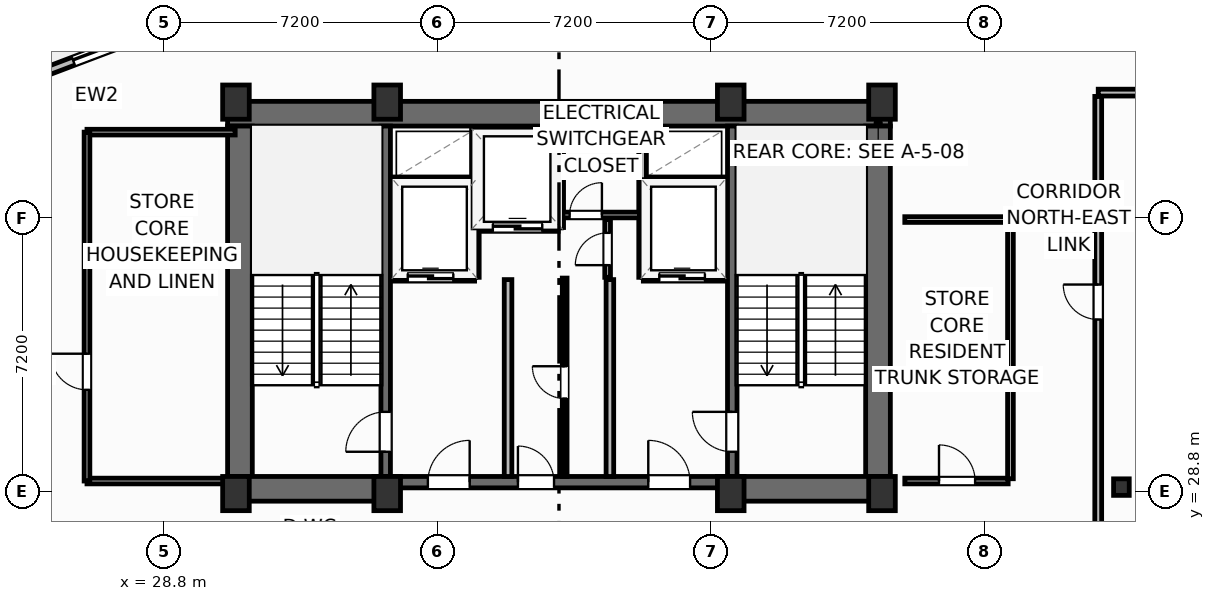
"""IFC4 building model, lengths in metres.
Left out: names, types, materials, properties, quantities, classifications, styles, units other than length and angle.
Written with IfcOpenShell. Run it as: python <this file> out.ifc"""

import sys

from ifc_helpers import new_model, si_unit, direction, frame, frame_2d, origin, origin_2d, place, context, subcontext, project, spatial, rectangle, i_section, extrude, element, fill, save


model = new_model("IFC4")
c1 = context("Model", 3, precision=1e-05, world=origin(), true_north=direction((0.0, 1.0)))
c2 = subcontext(c1, "Body", "Model", "MODEL_VIEW")
j1 = project(units=[si_unit("LENGTHUNIT", "METRE"), si_unit("PLANEANGLEUNIT", "RADIAN")], contexts=[c1])
p1 = place(None, origin())
s1 = spatial("IfcSite", under=j1, at=p1, CompositionType="ELEMENT")
p2 = place(p1, origin())
s2 = spatial("IfcBuilding", under=s1, at=p2, CompositionType="ELEMENT")
p3 = place(p2, frame((0.0, 0.0, 231.2)))
s3 = spatial("IfcBuildingStorey", under=s2, at=p3, CompositionType="ELEMENT", Elevation=231.2)
for number, where, z_axis, x_axis in (
    (1, (30.7, 28.75, 0.0), (0.0, 0.0, 1.0), (1.0, 0.0, 0.0)),
    (2, (34.68, 28.75, 0.0), (0.0, 0.0, 1.0), (1.0, 0.0, 0.0)),
    (3, (43.72, 28.75, 0.0), (0.0, 0.0, 1.0), (1.0, 0.0, 0.0)),
    (4, (47.7, 28.75, 0.0), (0.0, 0.0, 1.0), (1.0, 0.0, 0.0)),
    (5, (30.7, 39.05, 0.0), (0.0, 0.0, 1.0), (1.0, 0.0, 0.0)),
    (6, (34.68, 39.05, 0.0), (0.0, 0.0, 1.0), (1.0, 0.0, 0.0)),
    (7, (43.72, 39.05, 0.0), (0.0, 0.0, 1.0), (1.0, 0.0, 0.0)),
    (8, (47.7, 39.05, 0.0), (0.0, 0.0, 1.0), (1.0, 0.0, 0.0)),
):
    element("IfcColumn", number, at=place(p3, frame(where, z_axis=z_axis, x_axis=x_axis)), inside=s3, PredefinedType="COLUMN", context=c2, shape_type="SweptSolid", body=[
        extrude(rectangle(XDim=0.7, YDim=0.9, at=origin_2d()), origin(), (0.0, 0.0, 1.0), 3.7),
    ])
p4 = place(p3, frame((54.0, 28.92, 0.0), z_axis=(0.0, 0.0, 1.0), x_axis=(1.0, 0.0, 0.0)))
e9 = element("IfcColumn", 9, at=p4, inside=s3, PredefinedType="COLUMN", context=c2, shape_type="SweptSolid", body=[
    extrude(i_section(OverallWidth=0.412, OverallDepth=0.435, WebThickness=0.036, FlangeThickness=0.057, FilletRadius=0.025, at=origin_2d()), origin(), (0.0, 0.0, 1.0), 3.7),
])
p5 = place(p3, frame((30.48, 38.745, 0.0), z_axis=(0.0, 0.0, 1.0), x_axis=(1.0, 0.0, 0.0)))
e10 = element("IfcWall", 10, at=p5, inside=s3, PredefinedType="SHEAR", context=c2, shape_type="SweptSolid", body=[
    extrude(rectangle(XDim=17.44, YDim=0.65, at=frame_2d((8.72, 0.0))), origin(), (0.0, 0.0, 1.0), 3.45),
])
for number, where, z_axis, x_axis in (
    (11, (30.805, 29.2, 0.0), (0.0, 0.0, 1.0), (0.0, 1.0, 0.0)),
    (12, (47.595, 29.2, 0.0), (0.0, 0.0, 1.0), (0.0, 1.0, 0.0)),
):
    element("IfcWall", number, at=place(p3, frame(where, z_axis=z_axis, x_axis=x_axis)), inside=s3, PredefinedType="SHEAR", context=c2, shape_type="SweptSolid", body=[
        extrude(rectangle(XDim=9.22, YDim=0.65, at=frame_2d((4.61, 0.0))), origin(), (0.0, 0.0, 1.0), 3.45),
    ])
p6 = place(p3, frame((30.48, 28.875, 0.0), z_axis=(0.0, 0.0, 1.0), x_axis=(1.0, 0.0, 0.0)))
e13 = element("IfcWall", 13, at=p6, inside=s3, PredefinedType="SHEAR", context=c2, shape_type="SweptSolid", body=[
    extrude(rectangle(XDim=4.32, YDim=0.65, at=frame_2d((2.16, 0.0))), origin(), (0.0, 0.0, 1.0), 3.45),
])
p7 = place(p3, frame((43.6, 28.875, 0.0), z_axis=(0.0, 0.0, 1.0), x_axis=(1.0, 0.0, 0.0)))
e14 = element("IfcWall", 14, at=p7, inside=s3, PredefinedType="SHEAR", context=c2, shape_type="SweptSolid", body=[
    extrude(rectangle(XDim=4.32, YDim=0.65, at=frame_2d((2.16, 0.0))), origin(), (0.0, 0.0, 1.0), 3.45),
])
p8 = place(p3, frame((34.8, 29.05, 0.0), z_axis=(0.0, 0.0, 1.0), x_axis=(1.0, 0.0, 0.0)))
e15 = element("IfcWall", 15, at=p8, inside=s3, PredefinedType="SHEAR", context=c2, shape_type="SweptSolid", body=[
    extrude(rectangle(XDim=8.8, YDim=0.3, at=frame_2d((4.4, 0.0))), origin(), (0.0, 0.0, 1.0), 3.45),
])
p9 = place(p8, frame((0.95, 0.0, 0.0)))
e16 = element("IfcOpeningElement", 16, at=p9, cuts=e15, PredefinedType="OPENING", context=c2, shape_type="SweptSolid", body=[
    extrude(rectangle(XDim=1.1, YDim=2.15, at=frame_2d((0.55, 1.075))), frame((0.0, 0.16, 0.0), z_axis=(0.0, -1.0, 0.0), x_axis=(1.0, 0.0, 0.0)), (0.0, 0.0, 1.0), 0.32),
])
p10 = place(p8, frame((6.75, 0.0, 0.0)))
e17 = element("IfcOpeningElement", 17, at=p10, cuts=e15, PredefinedType="OPENING", context=c2, shape_type="SweptSolid", body=[
    extrude(rectangle(XDim=1.1, YDim=2.15, at=frame_2d((0.55, 1.075))), frame((0.0, 0.16, 0.0), z_axis=(0.0, -1.0, 0.0), x_axis=(1.0, 0.0, 0.0)), (0.0, 0.0, 1.0), 0.32),
])
p11 = place(p8, frame((3.32, 0.0, 0.0)))
e18 = element("IfcOpeningElement", 18, at=p11, cuts=e15, PredefinedType="OPENING", context=c2, shape_type="SweptSolid", body=[
    extrude(rectangle(XDim=0.95, YDim=2.15, at=frame_2d((0.475, 1.075))), frame((0.0, 0.16, 0.0), z_axis=(0.0, -1.0, 0.0), x_axis=(1.0, 0.0, 0.0)), (0.0, 0.0, 1.0), 0.32),
])
p12 = place(p3, frame((34.64, 29.2, 0.0), z_axis=(0.0, 0.0, 1.0), x_axis=(0.0, 1.0, 0.0)))
e19 = element("IfcWall", 19, at=p12, inside=s3, PredefinedType="SHEAR", context=c2, shape_type="SweptSolid", body=[
    extrude(rectangle(XDim=9.22, YDim=0.25, at=frame_2d((4.61, 0.0))), origin(), (0.0, 0.0, 1.0), 3.45),
])
p13 = place(p12, frame((0.65, 0.0, 0.0)))
e20 = element("IfcOpeningElement", 20, at=p13, cuts=e19, PredefinedType="OPENING", context=c2, shape_type="SweptSolid", body=[
    extrude(rectangle(XDim=1.05, YDim=2.15, at=frame_2d((0.525, 1.075))), frame((0.0, 0.135, 0.0), z_axis=(0.0, -1.0, 0.0), x_axis=(1.0, 0.0, 0.0)), (0.0, 0.0, 1.0), 0.27),
])
p14 = place(p3, frame((43.76, 29.2, 0.0), z_axis=(0.0, 0.0, 1.0), x_axis=(0.0, 1.0, 0.0)))
e21 = element("IfcWall", 21, at=p14, inside=s3, PredefinedType="SHEAR", context=c2, shape_type="SweptSolid", body=[
    extrude(rectangle(XDim=9.22, YDim=0.25, at=frame_2d((4.61, 0.0))), origin(), (0.0, 0.0, 1.0), 3.45),
])
p15 = place(p14, frame((0.65, 0.0, 0.0)))
e22 = element("IfcOpeningElement", 22, at=p15, cuts=e21, PredefinedType="OPENING", context=c2, shape_type="SweptSolid", body=[
    extrude(rectangle(XDim=1.05, YDim=2.15, at=frame_2d((0.525, 1.075))), frame((0.0, 0.135, 0.0), z_axis=(0.0, -1.0, 0.0), x_axis=(1.0, 0.0, 0.0)), (0.0, 0.0, 1.0), 0.27),
])
p16 = place(p3, frame((23.149, 38.887, 0.0), z_axis=(0.0, 0.0, 1.0), x_axis=(0.9352192676, 0.354069091436, 0.0)))
e23 = element("IfcWall", 23, at=p16, inside=s3, PredefinedType="SOLIDWALL", context=c2, shape_type="SweptSolid", body=[
    extrude(rectangle(XDim=6.0, YDim=0.22, at=frame_2d((3.0, 0.0))), origin(), (0.0, 0.0, 1.0), 2.73),
])
p17 = place(p16, frame((3.5, 0.0, 0.0)))
e24 = element("IfcOpeningElement", 24, at=p17, cuts=e23, PredefinedType="OPENING", context=c2, shape_type="SweptSolid", body=[
    extrude(rectangle(XDim=2.1, YDim=2.3, at=frame_2d((1.05, 1.15))), frame((0.0, 0.12, 0.0), z_axis=(0.0, -1.0, 0.0), x_axis=(1.0, 0.0, 0.0)), (0.0, 0.0, 1.0), 0.24),
])
p18 = place(p16, frame((0.55, 0.0, 0.75)))
e25 = element("IfcOpeningElement", 25, at=p18, cuts=e23, PredefinedType="OPENING", context=c2, shape_type="SweptSolid", body=[
    extrude(rectangle(XDim=1.85, YDim=1.75, at=frame_2d((0.925, 0.875))), frame((0.0, 0.12, 0.0), z_axis=(0.0, -1.0, 0.0), x_axis=(1.0, 0.0, 0.0)), (0.0, 0.0, 1.0), 0.24),
])
p19 = place(p3, frame((53.39, 27.53, 0.0), z_axis=(0.0, 0.0, 1.0), x_axis=(0.0, 1.0, 0.0)))
e26 = element("IfcWall", 26, at=p19, inside=s3, PredefinedType="PARTITIONING", context=c2, shape_type="SweptSolid", body=[
    extrude(rectangle(XDim=11.67, YDim=0.18, at=frame_2d((5.835, 0.0))), origin(), (0.0, 0.0, 1.0), 3.45),
])
p20 = place(p19, frame((5.8, 0.0, 0.0)))
e27 = element("IfcOpeningElement", 27, at=p20, cuts=e26, PredefinedType="OPENING", context=c2, shape_type="SweptSolid", body=[
    extrude(rectangle(XDim=0.92, YDim=2.05, at=frame_2d((0.46, 1.025))), frame((0.0, 0.1, 0.0), z_axis=(0.0, -1.0, 0.0), x_axis=(1.0, 0.0, 0.0)), (0.0, 0.0, 1.0), 0.2),
])
p21 = place(p3, frame((53.39, 39.3, 0.0), z_axis=(0.0, 0.0, 1.0), x_axis=(1.0, 0.0, 0.0)))
e28 = element("IfcWall", 28, at=p21, inside=s3, PredefinedType="PARTITIONING", context=c2, shape_type="SweptSolid", body=[
    extrude(rectangle(XDim=15.713, YDim=0.18, at=frame_2d((7.856, 0.0))), origin(), (0.0, 0.0, 1.0), 3.45),
])
for number, where, z_axis, x_axis in (
    (29, (37.86, 29.2, 0.0), (0.0, 0.0, 1.0), (0.0, 1.0, 0.0)),
    (30, (40.54, 29.2, 0.0), (0.0, 0.0, 1.0), (0.0, 1.0, 0.0)),
):
    element("IfcWall", number, at=place(p3, frame(where, z_axis=z_axis, x_axis=x_axis)), inside=s3, PredefinedType="PARTITIONING", context=c2, shape_type="SweptSolid", body=[
        extrude(rectangle(XDim=5.18, YDim=0.2, at=frame_2d((2.59, 0.0))), origin(), (0.0, 0.0, 1.0), 3.45),
    ])
p22 = place(p3, frame((34.8, 34.44, 0.0), z_axis=(0.0, 0.0, 1.0), x_axis=(1.0, 0.0, 0.0)))
e31 = element("IfcWall", 31, at=p22, inside=s3, PredefinedType="PARTITIONING", context=c2, shape_type="SweptSolid", body=[
    extrude(rectangle(XDim=2.18, YDim=0.2, at=frame_2d((1.09, 0.0))), origin(), (0.0, 0.0, 1.0), 3.45),
])
p23 = place(p22, frame((0.42, 0.0, 0.0)))
e32 = element("IfcOpeningElement", 32, at=p23, cuts=e31, PredefinedType="OPENING", context=c2, shape_type="SweptSolid", body=[
    extrude(rectangle(XDim=1.2, YDim=2.2, at=frame_2d((0.6, 1.1))), frame((0.0, 0.11, 0.0), z_axis=(0.0, -1.0, 0.0), x_axis=(1.0, 0.0, 0.0)), (0.0, 0.0, 1.0), 0.22),
])
p24 = place(p3, frame((34.8, 36.98, 0.0), z_axis=(0.0, 0.0, 1.0), x_axis=(1.0, 0.0, 0.0)))
e33 = element("IfcWall", 33, at=p24, inside=s3, PredefinedType="PARTITIONING", context=c2, shape_type="SweptSolid", body=[
    extrude(rectangle(XDim=2.18, YDim=0.2, at=frame_2d((1.09, 0.0))), origin(), (0.0, 0.0, 1.0), 3.45),
])
p25 = place(p3, frame((37.0, 34.44, 0.0), z_axis=(0.0, 0.0, 1.0), x_axis=(0.0, 1.0, 0.0)))
e34 = element("IfcWall", 34, at=p25, inside=s3, PredefinedType="PARTITIONING", context=c2, shape_type="SweptSolid", body=[
    extrude(rectangle(XDim=3.9, YDim=0.2, at=frame_2d((1.95, 0.0))), origin(), (0.0, 0.0, 1.0), 3.45),
])
p26 = place(p3, frame((41.42, 34.44, 0.0), z_axis=(0.0, 0.0, 1.0), x_axis=(1.0, 0.0, 0.0)))
e35 = element("IfcWall", 35, at=p26, inside=s3, PredefinedType="PARTITIONING", context=c2, shape_type="SweptSolid", body=[
    extrude(rectangle(XDim=2.18, YDim=0.2, at=frame_2d((1.09, 0.0))), origin(), (0.0, 0.0, 1.0), 3.45),
])
p27 = place(p26, frame((0.42, 0.0, 0.0)))
e36 = element("IfcOpeningElement", 36, at=p27, cuts=e35, PredefinedType="OPENING", context=c2, shape_type="SweptSolid", body=[
    extrude(rectangle(XDim=1.2, YDim=2.2, at=frame_2d((0.6, 1.1))), frame((0.0, 0.11, 0.0), z_axis=(0.0, -1.0, 0.0), x_axis=(1.0, 0.0, 0.0)), (0.0, 0.0, 1.0), 0.22),
])
p28 = place(p3, frame((41.42, 36.98, 0.0), z_axis=(0.0, 0.0, 1.0), x_axis=(1.0, 0.0, 0.0)))
e37 = element("IfcWall", 37, at=p28, inside=s3, PredefinedType="PARTITIONING", context=c2, shape_type="SweptSolid", body=[
    extrude(rectangle(XDim=2.18, YDim=0.2, at=frame_2d((1.09, 0.0))), origin(), (0.0, 0.0, 1.0), 3.45),
])
p29 = place(p3, frame((41.4, 34.44, 0.0), z_axis=(0.0, 0.0, 1.0), x_axis=(0.0, 1.0, 0.0)))
e38 = element("IfcWall", 38, at=p29, inside=s3, PredefinedType="PARTITIONING", context=c2, shape_type="SweptSolid", body=[
    extrude(rectangle(XDim=3.9, YDim=0.2, at=frame_2d((1.95, 0.0))), origin(), (0.0, 0.0, 1.0), 3.45),
])
p30 = place(p3, frame((37.06, 35.75, 0.0), z_axis=(0.0, 0.0, 1.0), x_axis=(1.0, 0.0, 0.0)))
e39 = element("IfcWall", 39, at=p30, inside=s3, PredefinedType="PARTITIONING", context=c2, shape_type="SweptSolid", body=[
    extrude(rectangle(XDim=2.12, YDim=0.2, at=frame_2d((1.06, 0.0))), origin(), (0.0, 0.0, 1.0), 3.45),
])
p31 = place(p30, frame((0.4, 0.0, 0.0)))
e40 = element("IfcOpeningElement", 40, at=p31, cuts=e39, PredefinedType="OPENING", context=c2, shape_type="SweptSolid", body=[
    extrude(rectangle(XDim=1.3, YDim=2.2, at=frame_2d((0.65, 1.1))), frame((0.0, 0.11, 0.0), z_axis=(0.0, -1.0, 0.0), x_axis=(1.0, 0.0, 0.0)), (0.0, 0.0, 1.0), 0.22),
])
p32 = place(p3, frame((39.22, 35.75, 0.0), z_axis=(0.0, 0.0, 1.0), x_axis=(0.0, 1.0, 0.0)))
e41 = element("IfcWall", 41, at=p32, inside=s3, PredefinedType="PARTITIONING", context=c2, shape_type="SweptSolid", body=[
    extrude(rectangle(XDim=2.59, YDim=0.2, at=frame_2d((1.295, 0.0))), origin(), (0.0, 0.0, 1.0), 3.45),
])
p33 = place(p3, frame((39.3, 36.08, 0.0), z_axis=(0.0, 0.0, 1.0), x_axis=(1.0, 0.0, 0.0)))
e42 = element("IfcWall", 42, at=p33, inside=s3, PredefinedType="PARTITIONING", context=c2, shape_type="SweptSolid", body=[
    extrude(rectangle(XDim=2.02, YDim=0.15, at=frame_2d((1.01, 0.0))), origin(), (0.0, 0.0, 1.0), 3.45),
])
p34 = place(p33, frame((0.18, 0.0, 0.0)))
e43 = element("IfcOpeningElement", 43, at=p34, cuts=e42, PredefinedType="OPENING", context=c2, shape_type="SweptSolid", body=[
    extrude(rectangle(XDim=0.85, YDim=2.05, at=frame_2d((0.425, 1.025))), frame((0.0, 0.085, 0.0), z_axis=(0.0, -1.0, 0.0), x_axis=(1.0, 0.0, 0.0)), (0.0, 0.0, 1.0), 0.17),
])
p35 = place(p3, frame((40.48, 34.44, 0.0), z_axis=(0.0, 0.0, 1.0), x_axis=(0.0, 1.0, 0.0)))
e44 = element("IfcWall", 44, at=p35, inside=s3, PredefinedType="PARTITIONING", context=c2, shape_type="SweptSolid", body=[
    extrude(rectangle(XDim=1.52, YDim=0.15, at=frame_2d((0.76, 0.0))), origin(), (0.0, 0.0, 1.0), 3.45),
])
p36 = place(p35, frame((0.32, 0.0, 0.0)))
e45 = element("IfcOpeningElement", 45, at=p36, cuts=e44, PredefinedType="OPENING", context=c2, shape_type="SweptSolid", body=[
    extrude(rectangle(XDim=0.85, YDim=2.05, at=frame_2d((0.425, 1.025))), frame((0.0, 0.085, 0.0), z_axis=(0.0, -1.0, 0.0), x_axis=(1.0, 0.0, 0.0)), (0.0, 0.0, 1.0), 0.17),
])
p37 = place(p3, frame((39.35, 29.2, 0.0), z_axis=(0.0, 0.0, 1.0), x_axis=(0.0, 1.0, 0.0)))
e46 = element("IfcWall", 46, at=p37, inside=s3, PredefinedType="PARTITIONING", context=c2, shape_type="SweptSolid", body=[
    extrude(rectangle(XDim=5.22, YDim=0.125, at=frame_2d((2.61, 0.0))), origin(), (0.0, 0.0, 1.0), 3.45),
])
p38 = place(p37, frame((2.05, 0.0, 0.0)))
e47 = element("IfcOpeningElement", 47, at=p38, cuts=e46, PredefinedType="OPENING", context=c2, shape_type="SweptSolid", body=[
    extrude(rectangle(XDim=0.85, YDim=2.05, at=frame_2d((0.425, 1.025))), frame((0.0, 0.073, 0.0), z_axis=(0.0, -1.0, 0.0), x_axis=(1.0, 0.0, 0.0)), (0.0, 0.0, 1.0), 0.145),
])
p39 = place(p3, frame((26.78, 29.08, 0.0), z_axis=(0.0, 0.0, 1.0), x_axis=(1.0, 0.0, 0.0)))
e48 = element("IfcWall", 48, at=p39, inside=s3, PredefinedType="PARTITIONING", context=c2, shape_type="SweptSolid", body=[
    extrude(rectangle(XDim=3.7, YDim=0.15, at=frame_2d((1.85, 0.0))), origin(), (0.0, 0.0, 1.0), 3.45),
])
p40 = place(p3, frame((26.78, 38.26, 0.0), z_axis=(0.0, 0.0, 1.0), x_axis=(1.0, 0.0, 0.0)))
e49 = element("IfcWall", 49, at=p40, inside=s3, PredefinedType="PARTITIONING", context=c2, shape_type="SweptSolid", body=[
    extrude(rectangle(XDim=3.9, YDim=0.15, at=frame_2d((1.95, 0.0))), origin(), (0.0, 0.0, 1.0), 3.45),
])
p41 = place(p3, frame((26.78, 29.08, 0.0), z_axis=(0.0, 0.0, 1.0), x_axis=(0.0, 1.0, 0.0)))
e50 = element("IfcWall", 50, at=p41, inside=s3, PredefinedType="PARTITIONING", context=c2, shape_type="SweptSolid", body=[
    extrude(rectangle(XDim=9.18, YDim=0.15, at=frame_2d((4.59, 0.0))), origin(), (0.0, 0.0, 1.0), 3.45),
])
p42 = place(p41, frame((2.4, 0.0, 0.0)))
e51 = element("IfcOpeningElement", 51, at=p42, cuts=e50, PredefinedType="OPENING", context=c2, shape_type="SweptSolid", body=[
    extrude(rectangle(XDim=0.95, YDim=2.05, at=frame_2d((0.475, 1.025))), frame((0.0, 0.085, 0.0), z_axis=(0.0, -1.0, 0.0), x_axis=(1.0, 0.0, 0.0)), (0.0, 0.0, 1.0), 0.17),
])
p43 = place(p3, frame((48.3, 29.08, 0.0), z_axis=(0.0, 0.0, 1.0), x_axis=(1.0, 0.0, 0.0)))
e52 = element("IfcWall", 52, at=p43, inside=s3, PredefinedType="PARTITIONING", context=c2, shape_type="SweptSolid", body=[
    extrude(rectangle(XDim=2.72, YDim=0.15, at=frame_2d((1.36, 0.0))), origin(), (0.0, 0.0, 1.0), 2.662),
])
p44 = place(p43, frame((0.9, 0.0, 0.0)))
e53 = element("IfcOpeningElement", 53, at=p44, cuts=e52, PredefinedType="OPENING", context=c2, shape_type="SweptSolid", body=[
    extrude(rectangle(XDim=0.95, YDim=2.05, at=frame_2d((0.475, 1.025))), frame((0.0, 0.085, 0.0), z_axis=(0.0, -1.0, 0.0), x_axis=(1.0, 0.0, 0.0)), (0.0, 0.0, 1.0), 0.17),
])
p45 = place(p3, frame((48.3, 35.96, 0.0), z_axis=(0.0, 0.0, 1.0), x_axis=(1.0, 0.0, 0.0)))
e54 = element("IfcWall", 54, at=p45, inside=s3, PredefinedType="PARTITIONING", context=c2, shape_type="SweptSolid", body=[
    extrude(rectangle(XDim=2.72, YDim=0.15, at=frame_2d((1.36, 0.0))), origin(), (0.0, 0.0, 1.0), 3.45),
])
p46 = place(p3, frame((51.08, 29.14, 0.0), z_axis=(0.0, 0.0, 1.0), x_axis=(0.0, 1.0, 0.0)))
e55 = element("IfcWall", 55, at=p46, inside=s3, PredefinedType="PARTITIONING", context=c2, shape_type="SweptSolid", body=[
    extrude(rectangle(XDim=6.76, YDim=0.15, at=frame_2d((3.38, 0.0))), origin(), (0.0, 0.0, 1.0), 3.45),
])
p47 = place(p17, origin())
e56 = element("IfcDoor", 56, at=p47, inside=s3, OperationType="SLIDING_TO_LEFT", PredefinedType="DOOR", context=c2, shape_type="SweptSolid", body=[
    extrude(rectangle(XDim=2.1, YDim=2.3, at=frame_2d((1.05, 1.15))), frame((0.0, 0.025, 0.0), z_axis=(0.0, -1.0, 0.0), x_axis=(1.0, 0.0, 0.0)), (0.0, 0.0, 1.0), 0.05),
])
fill(e24, e56)
p48 = place(p20, origin())
e57 = element("IfcDoor", 57, at=p48, inside=s3, OperationType="SINGLE_SWING_RIGHT", PredefinedType="DOOR", context=c2, shape_type="SweptSolid", body=[
    extrude(rectangle(XDim=0.92, YDim=2.05, at=frame_2d((0.46, 1.025))), frame((0.0, 0.025, 0.0), z_axis=(0.0, -1.0, 0.0), x_axis=(1.0, 0.0, 0.0)), (0.0, 0.0, 1.0), 0.05),
])
fill(e27, e57)
p49 = place(p13, origin())
e58 = element("IfcDoor", 58, at=p49, inside=s3, OperationType="SINGLE_SWING_LEFT", PredefinedType="DOOR", context=c2, shape_type="SweptSolid", body=[
    extrude(rectangle(XDim=1.05, YDim=2.15, at=frame_2d((0.525, 1.075))), frame((0.0, 0.025, 0.0), z_axis=(0.0, -1.0, 0.0), x_axis=(1.0, 0.0, 0.0)), (0.0, 0.0, 1.0), 0.05),
])
fill(e20, e58)
p50 = place(p15, origin())
e59 = element("IfcDoor", 59, at=p50, inside=s3, OperationType="SINGLE_SWING_RIGHT", PredefinedType="DOOR", context=c2, shape_type="SweptSolid", body=[
    extrude(rectangle(XDim=1.05, YDim=2.15, at=frame_2d((0.525, 1.075))), frame((0.0, 0.025, 0.0), z_axis=(0.0, -1.0, 0.0), x_axis=(1.0, 0.0, 0.0)), (0.0, 0.0, 1.0), 0.05),
])
fill(e22, e59)
p51 = place(p9, origin())
e60 = element("IfcDoor", 60, at=p51, inside=s3, OperationType="SINGLE_SWING_RIGHT", PredefinedType="DOOR", context=c2, shape_type="SweptSolid", body=[
    extrude(rectangle(XDim=1.1, YDim=2.15, at=frame_2d((0.55, 1.075))), frame((0.0, 0.025, 0.0), z_axis=(0.0, -1.0, 0.0), x_axis=(1.0, 0.0, 0.0)), (0.0, 0.0, 1.0), 0.05),
])
fill(e16, e60)
p52 = place(p10, origin())
e61 = element("IfcDoor", 61, at=p52, inside=s3, OperationType="SINGLE_SWING_LEFT", PredefinedType="DOOR", context=c2, shape_type="SweptSolid", body=[
    extrude(rectangle(XDim=1.1, YDim=2.15, at=frame_2d((0.55, 1.075))), frame((0.0, 0.025, 0.0), z_axis=(0.0, -1.0, 0.0), x_axis=(1.0, 0.0, 0.0)), (0.0, 0.0, 1.0), 0.05),
])
fill(e17, e61)
p53 = place(p23, origin())
e62 = element("IfcDoor", 62, at=p53, inside=s3, OperationType="SLIDING_TO_LEFT", PredefinedType="DOOR", context=c2, shape_type="SweptSolid", body=[
    extrude(rectangle(XDim=1.2, YDim=2.2, at=frame_2d((0.6, 1.1))), frame((0.0, 0.025, 0.0), z_axis=(0.0, -1.0, 0.0), x_axis=(1.0, 0.0, 0.0)), (0.0, 0.0, 1.0), 0.05),
])
fill(e32, e62)
p54 = place(p27, origin())
e63 = element("IfcDoor", 63, at=p54, inside=s3, OperationType="SLIDING_TO_LEFT", PredefinedType="DOOR", context=c2, shape_type="SweptSolid", body=[
    extrude(rectangle(XDim=1.2, YDim=2.2, at=frame_2d((0.6, 1.1))), frame((0.0, 0.025, 0.0), z_axis=(0.0, -1.0, 0.0), x_axis=(1.0, 0.0, 0.0)), (0.0, 0.0, 1.0), 0.05),
])
fill(e36, e63)
p55 = place(p31, origin())
e64 = element("IfcDoor", 64, at=p55, inside=s3, OperationType="SLIDING_TO_LEFT", PredefinedType="DOOR", context=c2, shape_type="SweptSolid", body=[
    extrude(rectangle(XDim=1.3, YDim=2.2, at=frame_2d((0.65, 1.1))), frame((0.0, 0.025, 0.0), z_axis=(0.0, -1.0, 0.0), x_axis=(1.0, 0.0, 0.0)), (0.0, 0.0, 1.0), 0.05),
])
fill(e40, e64)
p56 = place(p34, origin())
e65 = element("IfcDoor", 65, at=p56, inside=s3, OperationType="SINGLE_SWING_RIGHT", PredefinedType="DOOR", context=c2, shape_type="SweptSolid", body=[
    extrude(rectangle(XDim=0.85, YDim=2.05, at=frame_2d((0.425, 1.025))), frame((0.0, 0.025, 0.0), z_axis=(0.0, -1.0, 0.0), x_axis=(1.0, 0.0, 0.0)), (0.0, 0.0, 1.0), 0.05),
])
fill(e43, e65)
p57 = place(p36, origin())
e66 = element("IfcDoor", 66, at=p57, inside=s3, OperationType="SINGLE_SWING_LEFT", PredefinedType="DOOR", context=c2, shape_type="SweptSolid", body=[
    extrude(rectangle(XDim=0.85, YDim=2.05, at=frame_2d((0.425, 1.025))), frame((0.0, 0.025, 0.0), z_axis=(0.0, -1.0, 0.0), x_axis=(1.0, 0.0, 0.0)), (0.0, 0.0, 1.0), 0.05),
])
fill(e45, e66)
p58 = place(p38, origin())
e67 = element("IfcDoor", 67, at=p58, inside=s3, OperationType="SINGLE_SWING_RIGHT", PredefinedType="DOOR", context=c2, shape_type="SweptSolid", body=[
    extrude(rectangle(XDim=0.85, YDim=2.05, at=frame_2d((0.425, 1.025))), frame((0.0, 0.025, 0.0), z_axis=(0.0, -1.0, 0.0), x_axis=(1.0, 0.0, 0.0)), (0.0, 0.0, 1.0), 0.05),
])
fill(e47, e67)
p59 = place(p11, origin())
e68 = element("IfcDoor", 68, at=p59, inside=s3, OperationType="SINGLE_SWING_LEFT", PredefinedType="DOOR", context=c2, shape_type="SweptSolid", body=[
    extrude(rectangle(XDim=0.95, YDim=2.15, at=frame_2d((0.475, 1.075))), frame((0.0, 0.025, 0.0), z_axis=(0.0, -1.0, 0.0), x_axis=(1.0, 0.0, 0.0)), (0.0, 0.0, 1.0), 0.05),
])
fill(e18, e68)
p60 = place(p42, origin())
e69 = element("IfcDoor", 69, at=p60, inside=s3, OperationType="SINGLE_SWING_RIGHT", PredefinedType="DOOR", context=c2, shape_type="SweptSolid", body=[
    extrude(rectangle(XDim=0.95, YDim=2.05, at=frame_2d((0.475, 1.025))), frame((0.0, 0.025, 0.0), z_axis=(0.0, -1.0, 0.0), x_axis=(1.0, 0.0, 0.0)), (0.0, 0.0, 1.0), 0.05),
])
fill(e51, e69)
p61 = place(p44, origin())
e70 = element("IfcDoor", 70, at=p61, inside=s3, OperationType="SINGLE_SWING_LEFT", PredefinedType="DOOR", context=c2, shape_type="SweptSolid", body=[
    extrude(rectangle(XDim=0.95, YDim=2.05, at=frame_2d((0.475, 1.025))), frame((0.0, 0.025, 0.0), z_axis=(0.0, -1.0, 0.0), x_axis=(1.0, 0.0, 0.0)), (0.0, 0.0, 1.0), 0.05),
])
fill(e53, e70)
save(model, sys.argv[1])
